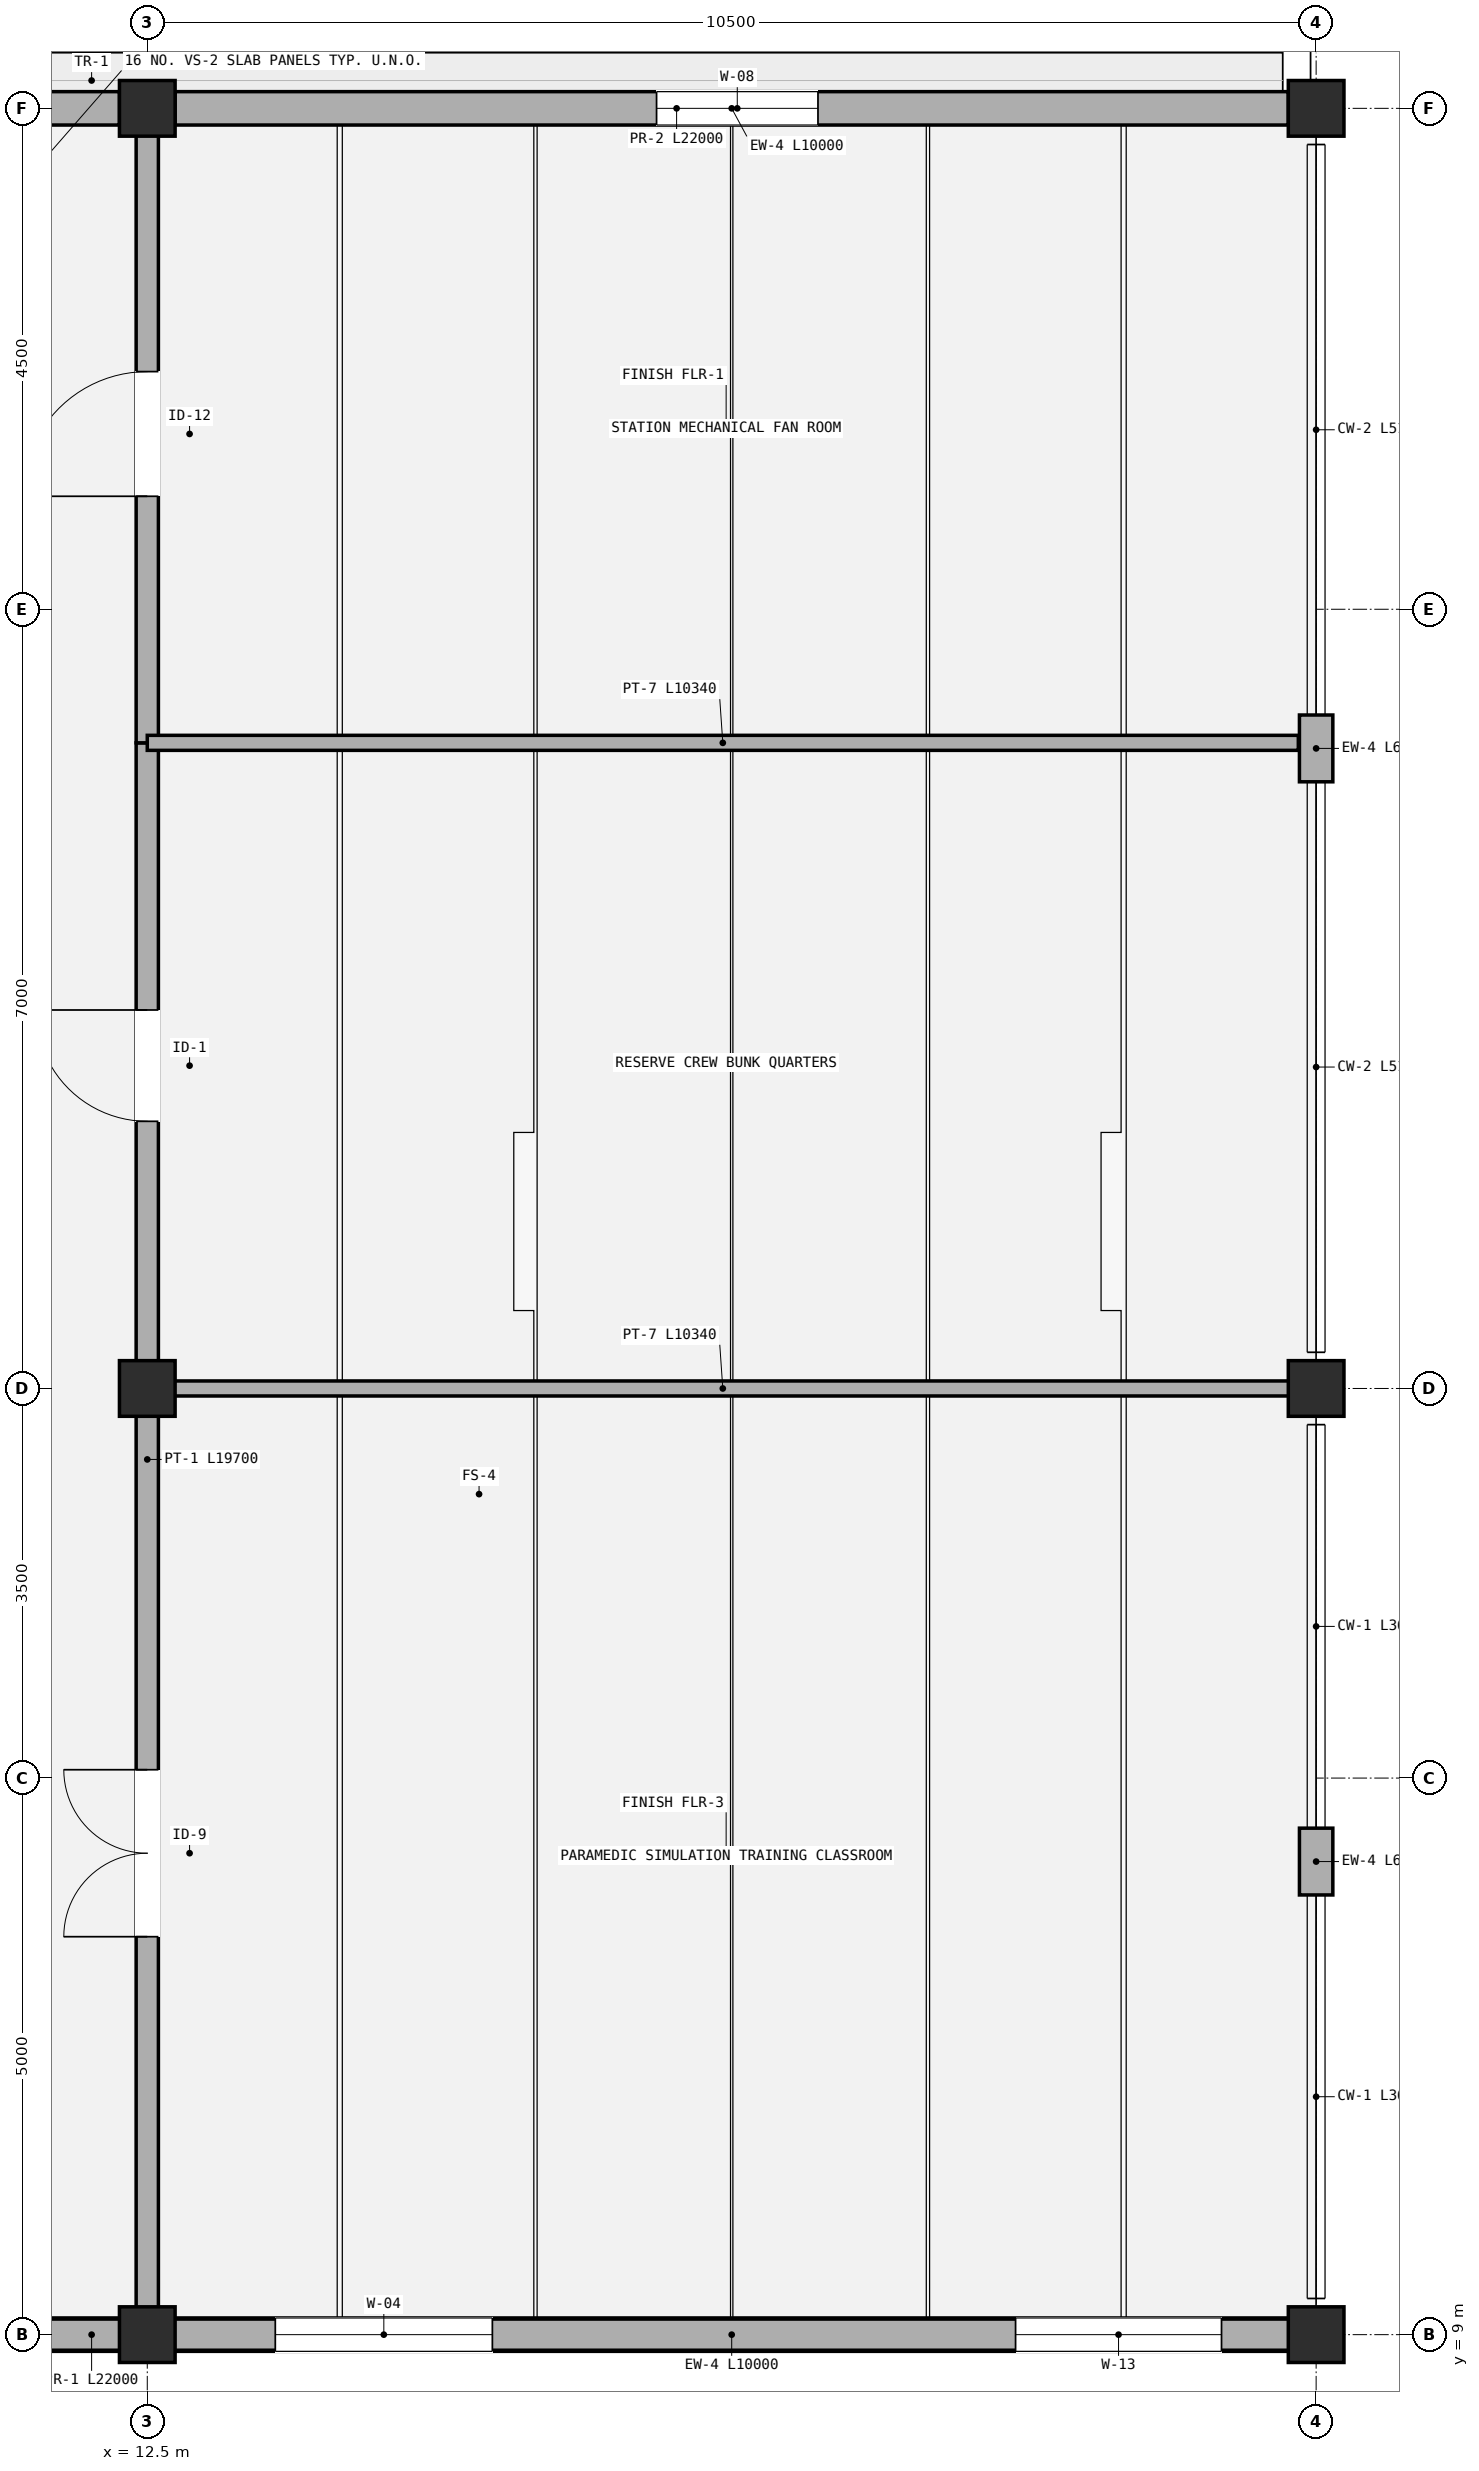
"""IFC4 building model, lengths in metres.
Left out: names, types, materials, properties, quantities, classifications, styles, units other than length and angle.
Written with IfcOpenShell. Run it as: python <this file> out.ifc"""

import sys

from ifc_helpers import new_model, si_unit, direction, frame, frame_2d, origin, origin_2d, place, context, subcontext, project, spatial, polyline, rectangle, outline, extrude, element, fill, save


model = new_model("IFC4")
c1 = context("Model", 3, precision=1e-05, world=origin(), true_north=direction((0.0, 1.0)))
c2 = subcontext(c1, "Body", "Model", "MODEL_VIEW")
j1 = project(units=[si_unit("LENGTHUNIT", "METRE"), si_unit("PLANEANGLEUNIT", "RADIAN")], contexts=[c1])
p1 = place(None, origin())
s1 = spatial("IfcSite", under=j1, at=p1, CompositionType="ELEMENT")
p2 = place(p1, origin())
s2 = spatial("IfcBuilding", under=s1, at=p2, CompositionType="ELEMENT")
p3 = place(p2, frame((0.0, 0.0, 12.75)))
s3 = spatial("IfcBuildingStorey", under=s2, at=p3, CompositionType="ELEMENT", Elevation=12.75)
for number, where, z_axis, x_axis in (
    (1, (12.5, 9.0, 0.0), (0.0, 0.0, 1.0), (1.0, 0.0, 0.0)),
    (2, (12.5, 17.5, 0.0), (0.0, 0.0, 1.0), (1.0, 0.0, 0.0)),
    (3, (12.5, 29.0, 0.0), (0.0, 0.0, 1.0), (1.0, 0.0, 0.0)),
    (4, (23.0, 9.0, 0.0), (0.0, 0.0, 1.0), (1.0, 0.0, 0.0)),
    (5, (23.0, 17.5, 0.0), (0.0, 0.0, 1.0), (1.0, 0.0, 0.0)),
    (6, (23.0, 29.0, 0.0), (0.0, 0.0, 1.0), (1.0, 0.0, 0.0)),
):
    element("IfcColumn", number, at=place(p3, frame(where, z_axis=z_axis, x_axis=x_axis)), inside=s3, PredefinedType="COLUMN", context=c2, shape_type="SweptSolid", body=[
        extrude(rectangle(XDim=0.5, YDim=0.5, at=origin_2d()), origin(), (0.0, 0.0, 1.0), 2.9),
    ])
p4 = place(p3, frame((8.75, 9.0, 0.0), z_axis=(0.0, 0.0, 1.0), x_axis=(1.0, 0.0, 0.0)))
e7 = element("IfcWall", 7, at=p4, inside=s3, PredefinedType="STANDARD", context=c2, shape_type="SweptSolid", body=[
    extrude(rectangle(XDim=3.5, YDim=0.3, at=frame_2d((1.75, 0.0))), origin(), (0.0, 0.0, 1.0), 2.25),
])
p5 = place(p4, frame((0.9, 0.0, 0.66)))
e8 = element("IfcOpeningElement", 8, at=p5, cuts=e7, PredefinedType="OPENING", context=c2, shape_type="SweptSolid", body=[
    extrude(rectangle(XDim=1.95, YDim=1.35, at=frame_2d((0.975, 0.675))), frame((0.0, 0.16, 0.0), z_axis=(0.0, -1.0, 0.0), x_axis=(1.0, 0.0, 0.0)), (0.0, 0.0, 1.0), 0.32),
])
p6 = place(p3, frame((12.75, 9.0, 0.0), z_axis=(0.0, 0.0, 1.0), x_axis=(1.0, 0.0, 0.0)))
e9 = element("IfcWall", 9, at=p6, inside=s3, PredefinedType="STANDARD", context=c2, shape_type="SweptSolid", body=[
    extrude(rectangle(XDim=10.0, YDim=0.3, at=frame_2d((5.0, 0.0))), origin(), (0.0, 0.0, 1.0), 2.25),
])
p7 = place(p6, frame((0.9, 0.0, 0.66)))
e10 = element("IfcOpeningElement", 10, at=p7, cuts=e9, PredefinedType="OPENING", context=c2, shape_type="SweptSolid", body=[
    extrude(rectangle(XDim=1.95, YDim=1.35, at=frame_2d((0.975, 0.675))), frame((0.0, 0.16, 0.0), z_axis=(0.0, -1.0, 0.0), x_axis=(1.0, 0.0, 0.0)), (0.0, 0.0, 1.0), 0.32),
])
p8 = place(p6, frame((7.55, 0.0, 0.71)))
e11 = element("IfcOpeningElement", 11, at=p8, cuts=e9, PredefinedType="OPENING", context=c2, shape_type="SweptSolid", body=[
    extrude(rectangle(XDim=1.85, YDim=1.3, at=frame_2d((0.925, 0.65))), frame((0.0, 0.16, 0.0), z_axis=(0.0, -1.0, 0.0), x_axis=(1.0, 0.0, 0.0)), (0.0, 0.0, 1.0), 0.32),
])
p9 = place(p3, frame((8.5, 9.0, 2.9), z_axis=(0.0, 0.0, 1.0), x_axis=(1.0, 0.0, 0.0)))
e12 = element("IfcWall", 12, at=p9, inside=s3, PredefinedType="PARAPET", context=c2, shape_type="SweptSolid", body=[
    extrude(outline(polyline([(0.0, 0.0), (4.0, 0.0), (4.0, 0.8), (3.557, 0.8), (3.556, 0.888), (3.112, 0.888), (3.111, 0.975), (2.668, 0.975), (2.667, 1.062), (2.223, 1.062), (2.222, 1.15), (1.779, 1.15), (1.778, 1.062), (1.334, 1.062), (1.333, 0.975), (0.89, 0.975), (0.889, 0.888), (0.445, 0.888), (0.444, 0.8), (0.0, 0.8), (0.0, 0.0)])), frame((0.0, 0.14, 0.0), z_axis=(0.0, -1.0, 0.0), x_axis=(1.0, 0.0, 0.0)), (0.0, 0.0, 1.0), 0.28),
])
p10 = place(p3, frame((8.5, 29.0, 2.9), z_axis=(0.0, 0.0, 1.0), x_axis=(1.0, 0.0, 0.0)))
e13 = element("IfcWall", 13, at=p10, inside=s3, PredefinedType="PARAPET", context=c2, shape_type="SweptSolid", body=[
    extrude(outline(polyline([(0.0, 0.0), (4.0, 0.0), (4.0, 0.8), (3.557, 0.8), (3.556, 0.863), (3.112, 0.863), (3.111, 0.925), (2.668, 0.925), (2.667, 0.988), (2.223, 0.988), (2.222, 1.05), (1.779, 1.05), (1.778, 0.988), (1.334, 0.988), (1.333, 0.925), (0.89, 0.925), (0.889, 0.863), (0.445, 0.863), (0.444, 0.8), (0.0, 0.8), (0.0, 0.0)])), frame((0.0, 0.12, 0.0), z_axis=(0.0, -1.0, 0.0), x_axis=(1.0, 0.0, 0.0)), (0.0, 0.0, 1.0), 0.24),
])
p11 = place(p3, frame((12.5, 9.0, 2.9), z_axis=(0.0, 0.0, 1.0), x_axis=(1.0, 0.0, 0.0)))
e14 = element("IfcWall", 14, at=p11, inside=s3, PredefinedType="PARAPET", context=c2, shape_type="SweptSolid", body=[
    extrude(outline(polyline([(0.0, 0.0), (10.5, 0.0), (10.5, 0.8), (9.334, 0.8), (9.333, 0.888), (8.168, 0.888), (8.167, 0.975), (7.001, 0.975), (7.0, 1.062), (5.834, 1.062), (5.833, 1.15), (4.668, 1.15), (4.667, 1.062), (3.501, 1.062), (3.5, 0.975), (2.334, 0.975), (2.333, 0.888), (1.168, 0.888), (1.167, 0.8), (0.0, 0.8), (0.0, 0.0)])), frame((0.0, 0.14, 0.0), z_axis=(0.0, -1.0, 0.0), x_axis=(1.0, 0.0, 0.0)), (0.0, 0.0, 1.0), 0.28),
])
p12 = place(p3, frame((12.5, 29.0, 2.9), z_axis=(0.0, 0.0, 1.0), x_axis=(1.0, 0.0, 0.0)))
e15 = element("IfcWall", 15, at=p12, inside=s3, PredefinedType="PARAPET", context=c2, shape_type="SweptSolid", body=[
    extrude(outline(polyline([(0.0, 0.0), (10.5, 0.0), (10.5, 0.8), (9.334, 0.8), (9.333, 0.863), (8.168, 0.863), (8.167, 0.925), (7.001, 0.925), (7.0, 0.988), (5.834, 0.988), (5.833, 1.05), (4.668, 1.05), (4.667, 0.988), (3.501, 0.988), (3.5, 0.925), (2.334, 0.925), (2.333, 0.863), (1.168, 0.863), (1.167, 0.8), (0.0, 0.8), (0.0, 0.0)])), frame((0.0, 0.12, 0.0), z_axis=(0.0, -1.0, 0.0), x_axis=(1.0, 0.0, 0.0)), (0.0, 0.0, 1.0), 0.24),
])
p13 = place(p3, frame((12.25, 29.0, 0.0), z_axis=(0.0, 0.0, 1.0), x_axis=(-1.0, 0.0, 0.0)))
e16 = element("IfcWall", 16, at=p13, inside=s3, PredefinedType="STANDARD", context=c2, shape_type="SweptSolid", body=[
    extrude(rectangle(XDim=3.5, YDim=0.3, at=frame_2d((1.75, 0.0))), origin(), (0.0, 0.0, 1.0), 2.25),
])
p14 = place(p13, frame((1.05, 0.0, 0.0)))
e17 = element("IfcOpeningElement", 17, at=p14, cuts=e16, PredefinedType="OPENING", context=c2, shape_type="SweptSolid", body=[
    extrude(rectangle(XDim=1.08, YDim=2.1, at=frame_2d((0.54, 1.05))), frame((0.0, 0.16, 0.0), z_axis=(0.0, -1.0, 0.0), x_axis=(1.0, 0.0, 0.0)), (0.0, 0.0, 1.0), 0.32),
])
p15 = place(p3, frame((22.75, 29.0, 0.0), z_axis=(0.0, 0.0, 1.0), x_axis=(-1.0, 0.0, 0.0)))
e18 = element("IfcWall", 18, at=p15, inside=s3, PredefinedType="STANDARD", context=c2, shape_type="SweptSolid", body=[
    extrude(rectangle(XDim=10.0, YDim=0.3, at=frame_2d((5.0, 0.0))), origin(), (0.0, 0.0, 1.0), 2.25),
])
p16 = place(p15, frame((4.225, 0.0, 0.75)))
e19 = element("IfcOpeningElement", 19, at=p16, cuts=e18, PredefinedType="OPENING", context=c2, shape_type="SweptSolid", body=[
    extrude(rectangle(XDim=1.45, YDim=1.25, at=frame_2d((0.725, 0.625))), frame((0.0, 0.16, 0.0), z_axis=(0.0, -1.0, 0.0), x_axis=(1.0, 0.0, 0.0)), (0.0, 0.0, 1.0), 0.32),
])
for number, where, z_axis, x_axis in (
    (20, (23.0, 12.95, 0.0), (0.0, 0.0, 1.0), (0.0, 1.0, 0.0)),
    (21, (23.0, 22.95, 0.0), (0.0, 0.0, 1.0), (0.0, 1.0, 0.0)),
):
    element("IfcWall", number, at=place(p3, frame(where, z_axis=z_axis, x_axis=x_axis)), inside=s3, PredefinedType="STANDARD", context=c2, shape_type="SweptSolid", body=[
        extrude(rectangle(XDim=0.6, YDim=0.3, at=frame_2d((0.3, 0.0))), origin(), (0.0, 0.0, 1.0), 2.25),
    ])
p17 = place(p3, frame((12.5, 9.15, 0.0), z_axis=(0.0, 0.0, 1.0), x_axis=(0.0, 1.0, 0.0)))
e22 = element("IfcWall", 22, at=p17, inside=s3, PredefinedType="PARTITIONING", context=c2, shape_type="SweptSolid", body=[
    extrude(rectangle(XDim=8.35, YDim=0.2, at=frame_2d((4.175, 0.0))), origin(), (0.0, 0.0, 1.0), 2.15),
])
p18 = place(p17, frame((3.425, 0.0, 0.0)))
e23 = element("IfcOpeningElement", 23, at=p18, cuts=e22, PredefinedType="OPENING", context=c2, shape_type="SweptSolid", body=[
    extrude(rectangle(XDim=1.5, YDim=2.15, at=frame_2d((0.75, 1.075))), frame((0.0, 0.11, 0.0), z_axis=(0.0, -1.0, 0.0), x_axis=(1.0, 0.0, 0.0)), (0.0, 0.0, 1.0), 0.22),
])
p19 = place(p3, frame((12.5, 17.5, 0.0), z_axis=(0.0, 0.0, 1.0), x_axis=(0.0, 1.0, 0.0)))
e24 = element("IfcWall", 24, at=p19, inside=s3, PredefinedType="PARTITIONING", context=c2, shape_type="SweptSolid", body=[
    extrude(rectangle(XDim=5.8, YDim=0.2, at=frame_2d((2.9, 0.0))), origin(), (0.0, 0.0, 1.0), 2.15),
])
p20 = place(p19, frame((2.4, 0.0, 0.0)))
e25 = element("IfcOpeningElement", 25, at=p20, cuts=e24, PredefinedType="OPENING", context=c2, shape_type="SweptSolid", body=[
    extrude(rectangle(XDim=1.0, YDim=2.12, at=frame_2d((0.5, 1.06))), frame((0.0, 0.11, 0.0), z_axis=(0.0, -1.0, 0.0), x_axis=(1.0, 0.0, 0.0)), (0.0, 0.0, 1.0), 0.22),
])
p21 = place(p3, frame((12.5, 23.3, 0.0), z_axis=(0.0, 0.0, 1.0), x_axis=(0.0, 1.0, 0.0)))
e26 = element("IfcWall", 26, at=p21, inside=s3, PredefinedType="PARTITIONING", context=c2, shape_type="SweptSolid", body=[
    extrude(rectangle(XDim=5.55, YDim=0.2, at=frame_2d((2.775, 0.0))), origin(), (0.0, 0.0, 1.0), 2.15),
])
p22 = place(p21, frame((2.215, 0.0, 0.0)))
e27 = element("IfcOpeningElement", 27, at=p22, cuts=e26, PredefinedType="OPENING", context=c2, shape_type="SweptSolid", body=[
    extrude(rectangle(XDim=1.12, YDim=2.15, at=frame_2d((0.56, 1.075))), frame((0.0, 0.11, 0.0), z_axis=(0.0, -1.0, 0.0), x_axis=(1.0, 0.0, 0.0)), (0.0, 0.0, 1.0), 0.22),
])
for number, where, z_axis, x_axis in (
    (28, (12.5, 17.5, 0.0), (0.0, 0.0, 1.0), (1.0, 0.0, 0.0)),
    (29, (12.5, 23.3, 0.0), (0.0, 0.0, 1.0), (1.0, 0.0, 0.0)),
):
    element("IfcWall", number, at=place(p3, frame(where, z_axis=z_axis, x_axis=x_axis)), inside=s3, PredefinedType="PARTITIONING", context=c2, shape_type="SweptSolid", body=[
        extrude(rectangle(XDim=10.34, YDim=0.135, at=frame_2d((5.17, 0.0))), origin(), (0.0, 0.0, 1.0), 2.15),
    ])
p23 = place(p7, origin())
e30 = element("IfcWindow", 30, at=p23, inside=s3, PartitioningType="DOUBLE_PANEL_HORIZONTAL", PredefinedType="WINDOW", context=c2, shape_type="SweptSolid", body=[
    extrude(rectangle(XDim=1.95, YDim=1.35, at=frame_2d((0.975, 0.675))), frame((0.0, 0.03, 0.0), z_axis=(0.0, -1.0, 0.0), x_axis=(1.0, 0.0, 0.0)), (0.0, 0.0, 1.0), 0.06),
])
fill(e10, e30)
p24 = place(p8, origin())
e31 = element("IfcWindow", 31, at=p24, inside=s3, PartitioningType="DOUBLE_PANEL_HORIZONTAL", PredefinedType="WINDOW", context=c2, shape_type="SweptSolid", body=[
    extrude(rectangle(XDim=1.85, YDim=1.3, at=frame_2d((0.925, 0.65))), frame((0.0, 0.03, 0.0), z_axis=(0.0, -1.0, 0.0), x_axis=(1.0, 0.0, 0.0)), (0.0, 0.0, 1.0), 0.06),
])
fill(e11, e31)
p25 = place(p16, origin())
e32 = element("IfcWindow", 32, at=p25, inside=s3, PartitioningType="DOUBLE_PANEL_HORIZONTAL", PredefinedType="WINDOW", context=c2, shape_type="SweptSolid", body=[
    extrude(rectangle(XDim=1.45, YDim=1.25, at=frame_2d((0.725, 0.625))), frame((0.0, 0.03, 0.0), z_axis=(0.0, -1.0, 0.0), x_axis=(1.0, 0.0, 0.0)), (0.0, 0.0, 1.0), 0.06),
])
fill(e19, e32)
p26 = place(p18, origin())
e33 = element("IfcDoor", 33, at=p26, inside=s3, OperationType="DOUBLE_DOOR_SINGLE_SWING", PredefinedType="DOOR", context=c2, shape_type="SweptSolid", body=[
    extrude(rectangle(XDim=1.5, YDim=2.15, at=frame_2d((0.75, 1.075))), frame((0.0, 0.025, 0.0), z_axis=(0.0, -1.0, 0.0), x_axis=(1.0, 0.0, 0.0)), (0.0, 0.0, 1.0), 0.05),
])
fill(e23, e33)
p27 = place(p20, origin())
e34 = element("IfcDoor", 34, at=p27, inside=s3, OperationType="SINGLE_SWING_RIGHT", PredefinedType="DOOR", context=c2, shape_type="SweptSolid", body=[
    extrude(rectangle(XDim=1.0, YDim=2.12, at=frame_2d((0.5, 1.06))), frame((0.0, 0.025, 0.0), z_axis=(0.0, -1.0, 0.0), x_axis=(1.0, 0.0, 0.0)), (0.0, 0.0, 1.0), 0.05),
])
fill(e25, e34)
p28 = place(p22, origin())
e35 = element("IfcDoor", 35, at=p28, inside=s3, OperationType="SINGLE_SWING_LEFT", PredefinedType="DOOR", context=c2, shape_type="SweptSolid", body=[
    extrude(rectangle(XDim=1.12, YDim=2.15, at=frame_2d((0.56, 1.075))), frame((0.0, 0.025, 0.0), z_axis=(0.0, -1.0, 0.0), x_axis=(1.0, 0.0, 0.0)), (0.0, 0.0, 1.0), 0.05),
])
fill(e27, e35)
save(model, sys.argv[1])
